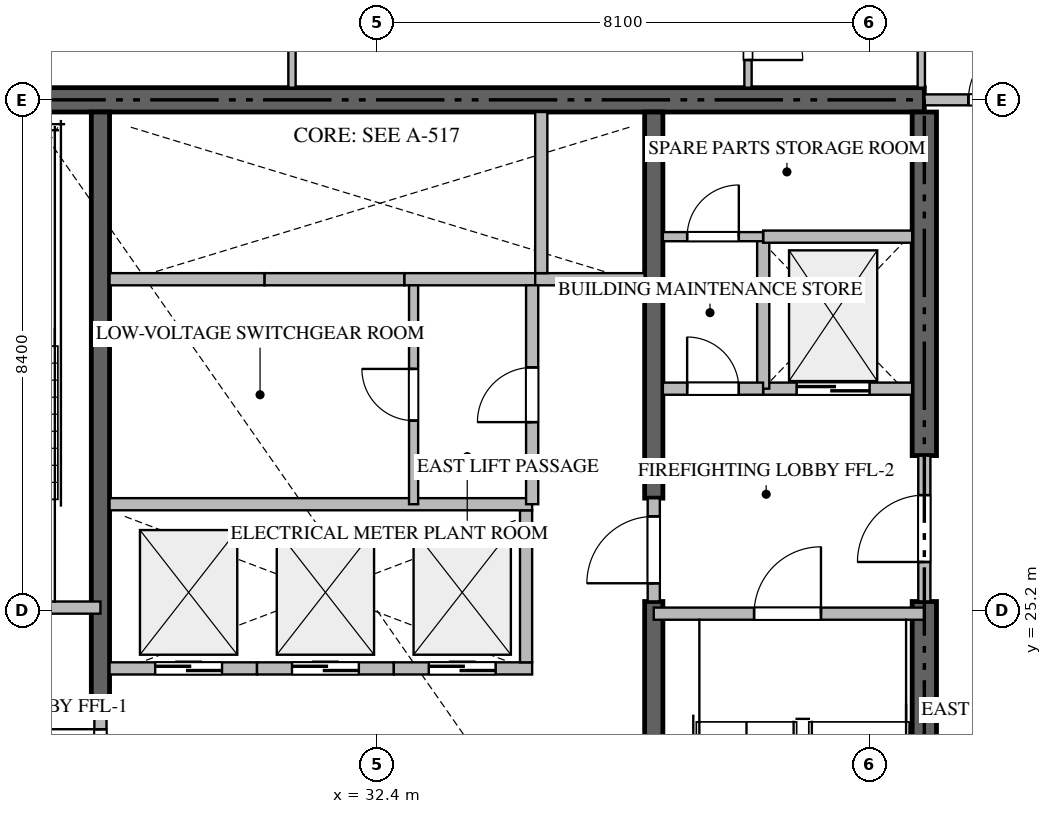
"""IFC4 building model, lengths in metres.
Left out: names, types, materials, properties, quantities, classifications, styles, units other than length and angle.
Written with IfcOpenShell. Run it as: python <this file> out.ifc"""

import sys

from ifc_helpers import new_model, si_unit, direction, frame, frame_2d, origin, place, context, subcontext, project, spatial, rectangle, extrude, source, transform, mapped, element, fill, save


model = new_model("IFC4")
c1 = context("Model", 3, precision=1e-05, world=origin(), true_north=direction((0.0, 1.0)))
c2 = subcontext(c1, "Body", "Model", "MODEL_VIEW")
j1 = project(units=[si_unit("LENGTHUNIT", "METRE"), si_unit("PLANEANGLEUNIT", "RADIAN")], contexts=[c1])
p1 = place(None, origin())
s1 = spatial("IfcSite", under=j1, at=p1, CompositionType="ELEMENT")
p2 = place(p1, origin())
s2 = spatial("IfcBuilding", under=s1, at=p2, CompositionType="ELEMENT")
p3 = place(p2, frame((0.0, 0.0, 180.15)))
s3 = spatial("IfcBuildingStorey", under=s2, at=p3, CompositionType="ELEMENT", Elevation=180.15)
p4 = place(p3, frame((41.4, 33.6, -0.26), z_axis=(0.0, 0.0, 1.0), x_axis=(-1.0, 0.0, 0.0)))
e1 = element("IfcWall", 1, at=p4, inside=s3, PredefinedType="SHEAR", context=c2, shape_type="SweptSolid", body=[
    extrude(rectangle(XDim=18.0, YDim=0.4, at=frame_2d((9.0, 0.0))), origin(), (0.0, 0.0, 1.0), 3.748),
])
p5 = place(p3, frame((41.4, 17.0, -0.26), z_axis=(0.0, 0.0, 1.0), x_axis=(0.0, 1.0, 0.0)))
e2 = element("IfcWall", 2, at=p5, inside=s3, PredefinedType="SHEAR", context=c2, shape_type="SweptSolid", body=[
    extrude(rectangle(XDim=8.35, YDim=0.4, at=frame_2d((4.175, 0.0))), origin(), (0.0, 0.0, 1.0), 3.748),
])
p6 = place(p3, frame((41.4, 27.75, -0.26), z_axis=(0.0, 0.0, 1.0), x_axis=(0.0, 1.0, 0.0)))
e3 = element("IfcWall", 3, at=p6, inside=s3, PredefinedType="SHEAR", context=c2, shape_type="SweptSolid", body=[
    extrude(rectangle(XDim=5.65, YDim=0.4, at=frame_2d((2.825, 0.0))), origin(), (0.0, 0.0, 1.0), 3.748),
])
p7 = place(p3, frame((27.85, 23.55, -0.26), z_axis=(0.0, 0.0, 1.0), x_axis=(0.0, 1.0, 0.0)))
e4 = element("IfcWall", 4, at=p7, inside=s3, PredefinedType="SHEAR", context=c2, shape_type="SweptSolid", body=[
    extrude(rectangle(XDim=9.85, YDim=0.3, at=frame_2d((4.925, 0.0))), origin(), (0.0, 0.0, 1.0), 3.748),
])
p8 = place(p3, frame((36.95, 17.0, -0.26), z_axis=(0.0, 0.0, 1.0), x_axis=(0.0, 1.0, 0.0)))
e5 = element("IfcWall", 5, at=p8, inside=s3, PredefinedType="SHEAR", context=c2, shape_type="SweptSolid", body=[
    extrude(rectangle(XDim=8.35, YDim=0.3, at=frame_2d((4.175, 0.0))), origin(), (0.0, 0.0, 1.0), 3.748),
])
p9 = place(p3, frame((36.95, 27.05, -0.26), z_axis=(0.0, 0.0, 1.0), x_axis=(0.0, 1.0, 0.0)))
e6 = element("IfcWall", 6, at=p9, inside=s3, PredefinedType="SHEAR", context=c2, shape_type="SweptSolid", body=[
    extrude(rectangle(XDim=6.35, YDim=0.3, at=frame_2d((3.175, 0.0))), origin(), (0.0, 0.0, 1.0), 3.748),
])
p10 = place(p3, frame((23.4, 25.25, 0.0), z_axis=(0.0, 0.0, 1.0), x_axis=(1.0, 0.0, 0.0)))
e7 = element("IfcWall", 7, at=p10, inside=s3, PredefinedType="STANDARD", context=c2, shape_type="SweptSolid", body=[
    extrude(rectangle(XDim=4.45, YDim=0.2, at=frame_2d((2.225, 0.0))), origin(), (0.0, 0.0, 1.0), 3.49),
])
p11 = place(p10, frame((1.65, 0.0, 0.0)))
e8 = element("IfcOpeningElement", 8, at=p11, cuts=e7, PredefinedType="OPENING", context=c2, shape_type="SweptSolid", body=[
    extrude(rectangle(XDim=1.1, YDim=2.15, at=frame_2d((0.55, 1.075))), frame((0.0, 0.11, 0.0), z_axis=(0.0, -1.0, 0.0), x_axis=(1.0, 0.0, 0.0)), (0.0, 0.0, 1.0), 0.22),
])
p12 = place(p3, frame((36.95, 25.15, 0.0), z_axis=(0.0, 0.0, 1.0), x_axis=(1.0, 0.0, 0.0)))
e9 = element("IfcWall", 9, at=p12, inside=s3, PredefinedType="STANDARD", context=c2, shape_type="SweptSolid", body=[
    extrude(rectangle(XDim=4.45, YDim=0.2, at=frame_2d((2.225, 0.0))), origin(), (0.0, 0.0, 1.0), 3.49),
])
p13 = place(p12, frame((1.65, 0.0, 0.0)))
e10 = element("IfcOpeningElement", 10, at=p13, cuts=e9, PredefinedType="OPENING", context=c2, shape_type="SweptSolid", body=[
    extrude(rectangle(XDim=1.1, YDim=2.15, at=frame_2d((0.55, 1.075))), frame((0.0, 0.11, 0.0), z_axis=(0.0, -1.0, 0.0), x_axis=(1.0, 0.0, 0.0)), (0.0, 0.0, 1.0), 0.22),
])
p14 = place(p3, frame((38.75, 28.85, 0.0), z_axis=(0.0, 0.0, 1.0), x_axis=(1.0, 0.0, 0.0)))
e11 = element("IfcWall", 11, at=p14, inside=s3, PredefinedType="STANDARD", context=c2, shape_type="SweptSolid", body=[
    extrude(rectangle(XDim=2.45, YDim=0.2, at=frame_2d((1.225, 0.0))), origin(), (0.0, 0.0, 1.0), 3.49),
])
p15 = place(p14, frame((0.55, 0.0, 0.0)))
e12 = element("IfcOpeningElement", 12, at=p15, cuts=e11, PredefinedType="OPENING", context=c2, shape_type="SweptSolid", body=[
    extrude(rectangle(XDim=1.2, YDim=2.2, at=frame_2d((0.6, 1.1))), frame((0.0, 0.11, 0.0), z_axis=(0.0, -1.0, 0.0), x_axis=(1.0, 0.0, 0.0)), (0.0, 0.0, 1.0), 0.22),
])
p16 = place(p3, frame((28.0, 24.25, 0.0), z_axis=(0.0, 0.0, 1.0), x_axis=(1.0, 0.0, 0.0)))
e13 = element("IfcWall", 13, at=p16, inside=s3, PredefinedType="STANDARD", context=c2, shape_type="SweptSolid", body=[
    extrude(rectangle(XDim=2.425, YDim=0.2, at=frame_2d((1.212, 0.0))), origin(), (0.0, 0.0, 1.0), 3.49),
])
p17 = place(p16, frame((0.75, 0.0, 0.0)))
e14 = element("IfcOpeningElement", 14, at=p17, cuts=e13, PredefinedType="OPENING", context=c2, shape_type="SweptSolid", body=[
    extrude(rectangle(XDim=1.1, YDim=2.2, at=frame_2d((0.55, 1.1))), frame((0.0, 0.11, 0.0), z_axis=(0.0, -1.0, 0.0), x_axis=(1.0, 0.0, 0.0)), (0.0, 0.0, 1.0), 0.22),
])
p18 = place(p3, frame((30.425, 24.25, 0.0), z_axis=(0.0, 0.0, 1.0), x_axis=(1.0, 0.0, 0.0)))
e15 = element("IfcWall", 15, at=p18, inside=s3, PredefinedType="STANDARD", context=c2, shape_type="SweptSolid", body=[
    extrude(rectangle(XDim=2.25, YDim=0.2, at=frame_2d((1.125, 0.0))), origin(), (0.0, 0.0, 1.0), 3.49),
])
p19 = place(p18, frame((0.575, 0.0, 0.0)))
e16 = element("IfcOpeningElement", 16, at=p19, cuts=e15, PredefinedType="OPENING", context=c2, shape_type="SweptSolid", body=[
    extrude(rectangle(XDim=1.1, YDim=2.2, at=frame_2d((0.55, 1.1))), frame((0.0, 0.11, 0.0), z_axis=(0.0, -1.0, 0.0), x_axis=(1.0, 0.0, 0.0)), (0.0, 0.0, 1.0), 0.22),
])
p20 = place(p3, frame((32.675, 24.25, 0.0), z_axis=(0.0, 0.0, 1.0), x_axis=(1.0, 0.0, 0.0)))
e17 = element("IfcWall", 17, at=p20, inside=s3, PredefinedType="STANDARD", context=c2, shape_type="SweptSolid", body=[
    extrude(rectangle(XDim=2.275, YDim=0.2, at=frame_2d((1.137, 0.0))), origin(), (0.0, 0.0, 1.0), 3.49),
])
p21 = place(p20, frame((0.575, 0.0, 0.0)))
e18 = element("IfcOpeningElement", 18, at=p21, cuts=e17, PredefinedType="OPENING", context=c2, shape_type="SweptSolid", body=[
    extrude(rectangle(XDim=1.1, YDim=2.2, at=frame_2d((0.55, 1.1))), frame((0.0, 0.11, 0.0), z_axis=(0.0, -1.0, 0.0), x_axis=(1.0, 0.0, 0.0)), (0.0, 0.0, 1.0), 0.22),
])
p22 = place(p3, frame((34.85, 24.35, 0.0), z_axis=(0.0, 0.0, 1.0), x_axis=(0.0, 1.0, 0.0)))
e19 = element("IfcWall", 19, at=p22, inside=s3, PredefinedType="STANDARD", context=c2, shape_type="SweptSolid", body=[
    extrude(rectangle(XDim=2.5, YDim=0.2, at=frame_2d((1.25, 0.0))), origin(), (0.0, 0.0, 1.0), 3.49),
])
p23 = place(p3, frame((28.0, 30.65, 0.0), z_axis=(0.0, 0.0, 1.0), x_axis=(1.0, 0.0, 0.0)))
e20 = element("IfcWall", 20, at=p23, inside=s3, PredefinedType="STANDARD", context=c2, shape_type="SweptSolid", body=[
    extrude(rectangle(XDim=2.55, YDim=0.2, at=frame_2d((1.275, 0.0))), origin(), (0.0, 0.0, 1.0), 3.49),
])
p24 = place(p3, frame((30.55, 30.65, 0.0), z_axis=(0.0, 0.0, 1.0), x_axis=(1.0, 0.0, 0.0)))
e21 = element("IfcWall", 21, at=p24, inside=s3, PredefinedType="STANDARD", context=c2, shape_type="SweptSolid", body=[
    extrude(rectangle(XDim=2.3, YDim=0.2, at=frame_2d((1.15, 0.0))), origin(), (0.0, 0.0, 1.0), 3.49),
])
p25 = place(p3, frame((32.85, 30.65, 0.0), z_axis=(0.0, 0.0, 1.0), x_axis=(1.0, 0.0, 0.0)))
e22 = element("IfcWall", 22, at=p25, inside=s3, PredefinedType="STANDARD", context=c2, shape_type="SweptSolid", body=[
    extrude(rectangle(XDim=2.15, YDim=0.2, at=frame_2d((1.075, 0.0))), origin(), (0.0, 0.0, 1.0), 3.49),
])
p26 = place(p3, frame((35.0, 30.65, 0.0), z_axis=(0.0, 0.0, 1.0), x_axis=(1.0, 0.0, 0.0)))
e23 = element("IfcWall", 23, at=p26, inside=s3, PredefinedType="STANDARD", context=c2, shape_type="SweptSolid", body=[
    extrude(rectangle(XDim=1.8, YDim=0.2, at=frame_2d((0.9, 0.0))), origin(), (0.0, 0.0, 1.0), 3.49),
])
p27 = place(p3, frame((35.1, 30.75, 0.0), z_axis=(0.0, 0.0, 1.0), x_axis=(0.0, 1.0, 0.0)))
e24 = element("IfcWall", 24, at=p27, inside=s3, PredefinedType="STANDARD", context=c2, shape_type="SweptSolid", body=[
    extrude(rectangle(XDim=2.65, YDim=0.2, at=frame_2d((1.325, 0.0))), origin(), (0.0, 0.0, 1.0), 3.49),
])
p28 = place(p3, frame((38.75, 28.85, 0.0), z_axis=(0.0, 0.0, 1.0), x_axis=(0.0, 1.0, 0.0)))
e25 = element("IfcWall", 25, at=p28, inside=s3, PredefinedType="STANDARD", context=c2, shape_type="SweptSolid", body=[
    extrude(rectangle(XDim=2.5, YDim=0.2, at=frame_2d((1.25, 0.0))), origin(), (0.0, 0.0, 1.0), 3.49),
])
p29 = place(p3, frame((38.75, 31.35, 0.0), z_axis=(0.0, 0.0, 1.0), x_axis=(1.0, 0.0, 0.0)))
e26 = element("IfcWall", 26, at=p29, inside=s3, PredefinedType="STANDARD", context=c2, shape_type="SweptSolid", body=[
    extrude(rectangle(XDim=2.45, YDim=0.2, at=frame_2d((1.225, 0.0))), origin(), (0.0, 0.0, 1.0), 3.49),
])
p30 = place(p3, frame((37.1, 28.85, 0.0), z_axis=(0.0, 0.0, 1.0), x_axis=(1.0, 0.0, 0.0)))
e27 = element("IfcWall", 27, at=p30, inside=s3, PredefinedType="STANDARD", context=c2, shape_type="SweptSolid", body=[
    extrude(rectangle(XDim=1.648, YDim=0.2, at=frame_2d((0.824, 0.0))), origin(), (0.0, 0.0, 1.0), 3.49),
])
p31 = place(p30, frame((0.399, 0.0, 0.0)))
e28 = element("IfcOpeningElement", 28, at=p31, cuts=e27, PredefinedType="OPENING", context=c2, shape_type="SweptSolid", body=[
    extrude(rectangle(XDim=0.85, YDim=2.1, at=frame_2d((0.425, 1.05))), frame((0.0, 0.11, 0.0), z_axis=(0.0, -1.0, 0.0), x_axis=(1.0, 0.0, 0.0)), (0.0, 0.0, 1.0), 0.22),
])
p32 = place(p3, frame((41.4, 25.352, 0.0), z_axis=(0.0, 0.0, 1.0), x_axis=(0.0, 1.0, 0.0)))
e29 = element("IfcWall", 29, at=p32, inside=s3, PredefinedType="STANDARD", context=c2, shape_type="SweptSolid", body=[
    extrude(rectangle(XDim=2.396, YDim=0.2, at=frame_2d((1.198, 0.0))), origin(), (0.0, 0.0, 1.0), 3.49),
])
p33 = place(p32, frame((0.648, 0.0, 0.0)))
e30 = element("IfcOpeningElement", 30, at=p33, cuts=e29, PredefinedType="OPENING", context=c2, shape_type="SweptSolid", body=[
    extrude(rectangle(XDim=1.1, YDim=2.15, at=frame_2d((0.55, 1.075))), frame((0.0, 0.11, 0.0), z_axis=(0.0, -1.0, 0.0), x_axis=(1.0, 0.0, 0.0)), (0.0, 0.0, 1.0), 0.22),
])
p34 = place(p3, frame((27.85, 21.852, 0.0), z_axis=(0.0, 0.0, 1.0), x_axis=(0.0, 1.0, 0.0)))
e31 = element("IfcWall", 31, at=p34, inside=s3, PredefinedType="STANDARD", context=c2, shape_type="SweptSolid", body=[
    extrude(rectangle(XDim=1.696, YDim=0.2, at=frame_2d((0.848, 0.0))), origin(), (0.0, 0.0, 1.0), 3.49),
])
p35 = place(p34, frame((0.298, 0.0, 0.0)))
e32 = element("IfcOpeningElement", 32, at=p35, cuts=e31, PredefinedType="OPENING", context=c2, shape_type="SweptSolid", body=[
    extrude(rectangle(XDim=1.1, YDim=2.15, at=frame_2d((0.55, 1.075))), frame((0.0, 0.11, 0.0), z_axis=(0.0, -1.0, 0.0), x_axis=(1.0, 0.0, 0.0)), (0.0, 0.0, 1.0), 0.22),
])
p36 = place(p3, frame((36.95, 25.352, 0.0), z_axis=(0.0, 0.0, 1.0), x_axis=(0.0, 1.0, 0.0)))
e33 = element("IfcWall", 33, at=p36, inside=s3, PredefinedType="STANDARD", context=c2, shape_type="SweptSolid", body=[
    extrude(rectangle(XDim=1.696, YDim=0.2, at=frame_2d((0.848, 0.0))), origin(), (0.0, 0.0, 1.0), 3.49),
])
p37 = place(p36, frame((0.298, 0.0, 0.0)))
e34 = element("IfcOpeningElement", 34, at=p37, cuts=e33, PredefinedType="OPENING", context=c2, shape_type="SweptSolid", body=[
    extrude(rectangle(XDim=1.1, YDim=2.15, at=frame_2d((0.55, 1.075))), frame((0.0, 0.11, 0.0), z_axis=(0.0, -1.0, 0.0), x_axis=(1.0, 0.0, 0.0)), (0.0, 0.0, 1.0), 0.22),
])
p38 = place(p3, frame((28.0, 26.95, 0.0), z_axis=(0.0, 0.0, 1.0), x_axis=(1.0, 0.0, 0.0)))
e35 = element("IfcWall", 35, at=p38, inside=s3, PredefinedType="STANDARD", context=c2, shape_type="SweptSolid", body=[
    extrude(rectangle(XDim=6.95, YDim=0.2, at=frame_2d((3.475, 0.0))), origin(), (0.0, 0.0, 1.0), 3.49),
])
p39 = place(p3, frame((37.1, 31.35, 0.0), z_axis=(0.0, 0.0, 1.0), x_axis=(1.0, 0.0, 0.0)))
e36 = element("IfcWall", 36, at=p39, inside=s3, PredefinedType="PARTITIONING", context=c2, shape_type="SweptSolid", body=[
    extrude(rectangle(XDim=1.648, YDim=0.15, at=frame_2d((0.824, 0.0))), origin(), (0.0, 0.0, 1.0), 3.49),
])
p40 = place(p39, frame((0.399, 0.0, 0.0)))
e37 = element("IfcOpeningElement", 37, at=p40, cuts=e36, PredefinedType="OPENING", context=c2, shape_type="SweptSolid", body=[
    extrude(rectangle(XDim=0.85, YDim=2.1, at=frame_2d((0.425, 1.05))), frame((0.0, 0.085, 0.0), z_axis=(0.0, -1.0, 0.0), x_axis=(1.0, 0.0, 0.0)), (0.0, 0.0, 1.0), 0.17),
])
p41 = place(p3, frame((34.95, 26.95, 0.0), z_axis=(0.0, 0.0, 1.0), x_axis=(0.0, 1.0, 0.0)))
e38 = element("IfcWall", 38, at=p41, inside=s3, PredefinedType="STANDARD", context=c2, shape_type="SweptSolid", body=[
    extrude(rectangle(XDim=3.6, YDim=0.2, at=frame_2d((1.8, 0.0))), origin(), (0.0, 0.0, 1.0), 3.49),
])
p42 = place(p41, frame((1.35, 0.0, 0.0)))
e39 = element("IfcOpeningElement", 39, at=p42, cuts=e38, PredefinedType="OPENING", context=c2, shape_type="SweptSolid", body=[
    extrude(rectangle(XDim=0.9, YDim=2.1, at=frame_2d((0.45, 1.05))), frame((0.0, 0.11, 0.0), z_axis=(0.0, -1.0, 0.0), x_axis=(1.0, 0.0, 0.0)), (0.0, 0.0, 1.0), 0.22),
])
p43 = place(p3, frame((33.0, 26.95, 0.0), z_axis=(0.0, 0.0, 1.0), x_axis=(0.0, 1.0, 0.0)))
e40 = element("IfcWall", 40, at=p43, inside=s3, PredefinedType="PARTITIONING", context=c2, shape_type="SweptSolid", body=[
    extrude(rectangle(XDim=3.6, YDim=0.15, at=frame_2d((1.8, 0.0))), origin(), (0.0, 0.0, 1.0), 3.49),
])
p44 = place(p43, frame((1.375, 0.0, 0.0)))
e41 = element("IfcOpeningElement", 41, at=p44, cuts=e40, PredefinedType="OPENING", context=c2, shape_type="SweptSolid", body=[
    extrude(rectangle(XDim=0.85, YDim=2.1, at=frame_2d((0.425, 1.05))), frame((0.0, 0.085, 0.0), z_axis=(0.0, -1.0, 0.0), x_axis=(1.0, 0.0, 0.0)), (0.0, 0.0, 1.0), 0.17),
])
p45 = place(p3, frame((41.402, 33.6, 0.0), z_axis=(0.0, 0.0, 1.0), x_axis=(1.0, 0.0, 0.0)))
e42 = element("IfcWall", 42, at=p45, inside=s3, PredefinedType="PARTITIONING", context=c2, shape_type="SweptSolid", body=[
    extrude(rectangle(XDim=2.446, YDim=0.18, at=frame_2d((1.223, 0.0))), origin(), (0.0, 0.0, 1.0), 3.49),
])
p46 = place(p45, frame((0.723, 0.0, 0.0)))
e43 = element("IfcOpeningElement", 43, at=p46, cuts=e42, PredefinedType="OPENING", context=c2, shape_type="SweptSolid", body=[
    extrude(rectangle(XDim=1.0, YDim=2.15, at=frame_2d((0.5, 1.075))), frame((0.0, 0.1, 0.0), z_axis=(0.0, -1.0, 0.0), x_axis=(1.0, 0.0, 0.0)), (0.0, 0.0, 1.0), 0.2),
])
p47 = place(p3, frame((41.35, 36.35, 0.0), z_axis=(0.0, 0.0, 1.0), x_axis=(0.0, -1.0, 0.0)))
e44 = element("IfcWall", 44, at=p47, inside=s3, PredefinedType="PARTITIONING", context=c2, shape_type="SweptSolid", body=[
    extrude(rectangle(XDim=2.55, YDim=0.12, at=frame_2d((1.275, 0.0))), origin(), (0.0, 0.0, 1.0), 3.49),
])
p48 = place(p3, frame((38.5, 35.75, 0.0), z_axis=(0.0, 0.0, 1.0), x_axis=(0.0, -1.0, 0.0)))
e45 = element("IfcWall", 45, at=p48, inside=s3, PredefinedType="PARTITIONING", context=c2, shape_type="SweptSolid", body=[
    extrude(rectangle(XDim=1.95, YDim=0.12, at=frame_2d((0.975, 0.0))), origin(), (0.0, 0.0, 1.0), 3.49),
])
p49 = place(p48, frame((0.595, 0.0, 0.0)))
e46 = element("IfcOpeningElement", 46, at=p49, cuts=e45, PredefinedType="OPENING", context=c2, shape_type="SweptSolid", body=[
    extrude(rectangle(XDim=0.9, YDim=2.1, at=frame_2d((0.45, 1.05))), frame((0.0, 0.07, 0.0), z_axis=(0.0, -1.0, 0.0), x_axis=(1.0, 0.0, 0.0)), (0.0, 0.0, 1.0), 0.14),
])
p50 = place(p3, frame((31.0, 35.748, 0.0), z_axis=(0.0, 0.0, 1.0), x_axis=(0.0, -1.0, 0.0)))
e47 = element("IfcWall", 47, at=p50, inside=s3, PredefinedType="PARTITIONING", context=c2, shape_type="SweptSolid", body=[
    extrude(rectangle(XDim=1.948, YDim=0.12, at=frame_2d((0.974, 0.0))), origin(), (0.0, 0.0, 1.0), 3.49),
])
m1 = source(origin(), c2, "Body", "SweptSolid", [
    extrude(rectangle(XDim=1.1, YDim=2.15, at=frame_2d((0.55, 1.075))), frame((0.0, 0.025, 0.0), z_axis=(0.0, -1.0, 0.0), x_axis=(1.0, 0.0, 0.0)), (0.0, 0.0, 1.0), 0.05),
])
p51 = place(p13, origin())
e48 = element("IfcDoor", 48, at=p51, inside=s3, OperationType="SINGLE_SWING_RIGHT", PredefinedType="DOOR", context=c2, shape_type="MappedRepresentation", body=[
    mapped(m1, transform((0.0, 0.0, 0.0), scale=1.0)),
])
fill(e10, e48)
m2 = source(origin(), c2, "Body", "SweptSolid", [
    extrude(rectangle(XDim=1.2, YDim=2.2, at=frame_2d((0.6, 1.1))), frame((0.0, 0.025, 0.0), z_axis=(0.0, -1.0, 0.0), x_axis=(1.0, 0.0, 0.0)), (0.0, 0.0, 1.0), 0.05),
])
p52 = place(p15, origin())
e49 = element("IfcDoor", 49, at=p52, inside=s3, OperationType="DOUBLE_DOOR_SLIDING", PredefinedType="DOOR", context=c2, shape_type="MappedRepresentation", body=[
    mapped(m2, transform((0.0, 0.0, 0.0), scale=1.0)),
])
fill(e12, e49)
m3 = source(origin(), c2, "Body", "SweptSolid", [
    extrude(rectangle(XDim=1.1, YDim=2.2, at=frame_2d((0.55, 1.1))), frame((0.0, 0.025, 0.0), z_axis=(0.0, -1.0, 0.0), x_axis=(1.0, 0.0, 0.0)), (0.0, 0.0, 1.0), 0.05),
])
p53 = place(p17, origin())
e50 = element("IfcDoor", 50, at=p53, inside=s3, OperationType="DOUBLE_DOOR_SLIDING", PredefinedType="DOOR", context=c2, shape_type="MappedRepresentation", body=[
    mapped(m3, transform((0.0, 0.0, 0.0), scale=1.0)),
])
fill(e14, e50)
p54 = place(p19, origin())
e51 = element("IfcDoor", 51, at=p54, inside=s3, OperationType="DOUBLE_DOOR_SLIDING", PredefinedType="DOOR", context=c2, shape_type="MappedRepresentation", body=[
    mapped(m3, transform((0.0, 0.0, 0.0), scale=1.0)),
])
fill(e16, e51)
p55 = place(p21, origin())
e52 = element("IfcDoor", 52, at=p55, inside=s3, OperationType="DOUBLE_DOOR_SLIDING", PredefinedType="DOOR", context=c2, shape_type="MappedRepresentation", body=[
    mapped(m3, transform((0.0, 0.0, 0.0), scale=1.0)),
])
fill(e18, e52)
m4 = source(origin(), c2, "Body", "SweptSolid", [
    extrude(rectangle(XDim=0.85, YDim=2.1, at=frame_2d((0.425, 1.05))), frame((0.0, 0.025, 0.0), z_axis=(0.0, -1.0, 0.0), x_axis=(1.0, 0.0, 0.0)), (0.0, 0.0, 1.0), 0.05),
])
p56 = place(p31, origin())
e53 = element("IfcDoor", 53, at=p56, inside=s3, OperationType="SINGLE_SWING_LEFT", PredefinedType="DOOR", context=c2, shape_type="MappedRepresentation", body=[
    mapped(m4, transform((0.0, 0.0, 0.0), scale=1.0)),
])
fill(e28, e53)
p57 = place(p33, origin())
e54 = element("IfcDoor", 54, at=p57, inside=s3, OperationType="SINGLE_SWING_LEFT", PredefinedType="DOOR", context=c2, shape_type="MappedRepresentation", body=[
    mapped(m1, transform((0.0, 0.0, 0.0), scale=1.0)),
])
fill(e30, e54)
p58 = place(p35, origin())
e55 = element("IfcDoor", 55, at=p58, inside=s3, OperationType="SINGLE_SWING_RIGHT", PredefinedType="DOOR", context=c2, shape_type="MappedRepresentation", body=[
    mapped(m1, transform((0.0, 0.0, 0.0), scale=1.0)),
])
fill(e32, e55)
p59 = place(p37, origin())
e56 = element("IfcDoor", 56, at=p59, inside=s3, OperationType="SINGLE_SWING_LEFT", PredefinedType="DOOR", context=c2, shape_type="MappedRepresentation", body=[
    mapped(m1, transform((0.0, 0.0, 0.0), scale=1.0)),
])
fill(e34, e56)
p60 = place(p40, origin())
e57 = element("IfcDoor", 57, at=p60, inside=s3, OperationType="SINGLE_SWING_RIGHT", PredefinedType="DOOR", context=c2, shape_type="MappedRepresentation", body=[
    mapped(m4, transform((0.0, 0.0, 0.0), scale=1.0)),
])
fill(e37, e57)
m5 = source(origin(), c2, "Body", "SweptSolid", [
    extrude(rectangle(XDim=0.9, YDim=2.1, at=frame_2d((0.45, 1.05))), frame((0.0, 0.025, 0.0), z_axis=(0.0, -1.0, 0.0), x_axis=(1.0, 0.0, 0.0)), (0.0, 0.0, 1.0), 0.05),
])
p61 = place(p42, origin())
e58 = element("IfcDoor", 58, at=p61, inside=s3, OperationType="SINGLE_SWING_LEFT", PredefinedType="DOOR", context=c2, shape_type="MappedRepresentation", body=[
    mapped(m5, transform((0.0, 0.0, 0.0), scale=1.0)),
])
fill(e39, e58)
p62 = place(p44, origin())
e59 = element("IfcDoor", 59, at=p62, inside=s3, OperationType="SINGLE_SWING_RIGHT", PredefinedType="DOOR", context=c2, shape_type="MappedRepresentation", body=[
    mapped(m4, transform((0.0, 0.0, 0.0), scale=1.0)),
])
fill(e41, e59)
m6 = source(origin(), c2, "Body", "SweptSolid", [
    extrude(rectangle(XDim=1.0, YDim=2.15, at=frame_2d((0.5, 1.075))), frame((0.0, 0.025, 0.0), z_axis=(0.0, -1.0, 0.0), x_axis=(1.0, 0.0, 0.0)), (0.0, 0.0, 1.0), 0.05),
])
p63 = place(p46, origin())
e60 = element("IfcDoor", 60, at=p63, inside=s3, OperationType="SINGLE_SWING_RIGHT", PredefinedType="DOOR", context=c2, shape_type="MappedRepresentation", body=[
    mapped(m6, transform((0.0, 0.0, 0.0), scale=1.0)),
])
fill(e43, e60)
p64 = place(p49, origin())
e61 = element("IfcDoor", 61, at=p64, inside=s3, OperationType="SINGLE_SWING_RIGHT", PredefinedType="DOOR", context=c2, shape_type="MappedRepresentation", body=[
    mapped(m5, transform((0.0, 0.0, 0.0), scale=1.0)),
])
fill(e46, e61)
save(model, sys.argv[1])
